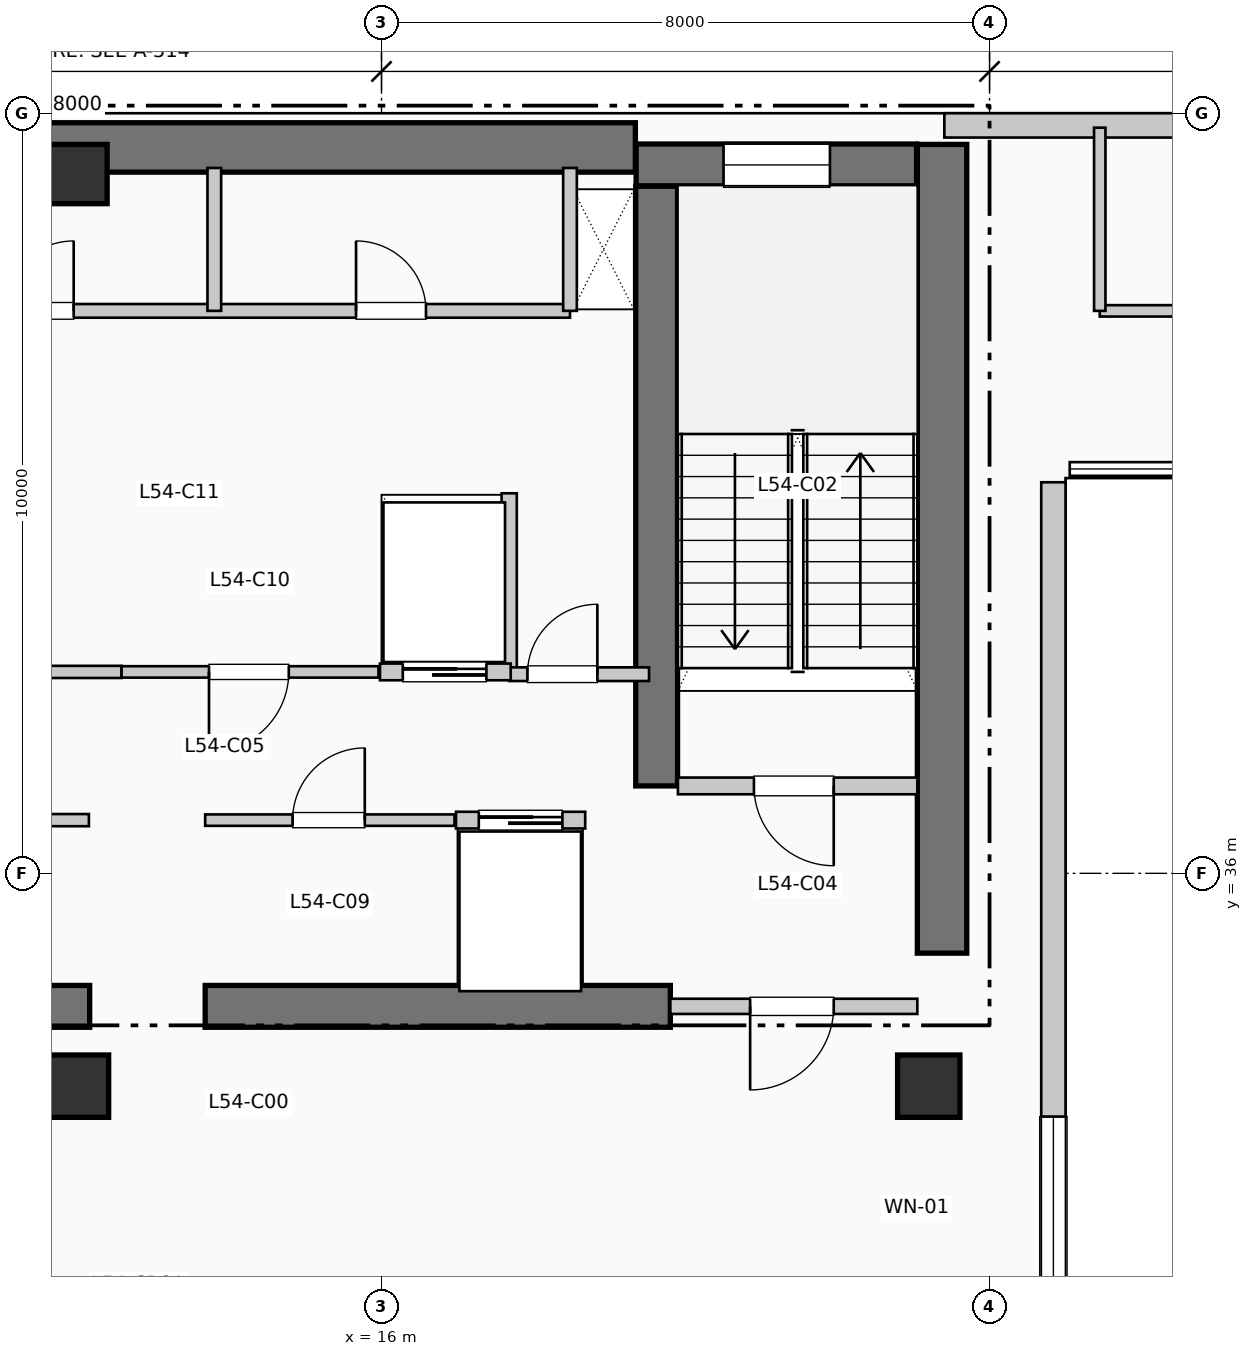
"""IFC4 building model, lengths in metres.
Left out: names, types, materials, properties, quantities, classifications, styles, units other than length and angle.
Written with IfcOpenShell. Run it as: python <this file> out.ifc"""

import sys

from ifc_helpers import new_model, si_unit, direction, frame, frame_2d, origin, origin_2d, place, context, subcontext, project, spatial, rectangle, extrude, element, fill, save


model = new_model("IFC4")
c1 = context("Model", 3, precision=1e-05, world=origin(), true_north=direction((0.0, 1.0)))
c2 = subcontext(c1, "Body", "Model", "MODEL_VIEW")
j1 = project(units=[si_unit("LENGTHUNIT", "METRE"), si_unit("PLANEANGLEUNIT", "RADIAN")], contexts=[c1])
p1 = place(None, origin())
s1 = spatial("IfcSite", under=j1, at=p1, CompositionType="ELEMENT")
p2 = place(p1, origin())
s2 = spatial("IfcBuilding", under=s1, at=p2, CompositionType="ELEMENT")
p3 = place(p2, frame((0.0, 0.0, 223.74)))
s3 = spatial("IfcBuildingStorey", under=s2, at=p3, CompositionType="ELEMENT", Elevation=223.74)
p4 = place(p3, frame((5.36, 45.55, 0.0), z_axis=(0.0, 0.0, 1.0), x_axis=(1.0, 0.0, 0.0)))
e1 = element("IfcWall", 1, at=p4, inside=s3, PredefinedType="SHEAR", context=c2, shape_type="SweptSolid", body=[
    extrude(rectangle(XDim=13.98, YDim=0.65, at=frame_2d((6.99, 0.0))), origin(), (0.0, 0.0, 1.0), 3.96),
])
p5 = place(p3, frame((23.375, 34.95, 0.0), z_axis=(0.0, 0.0, 1.0), x_axis=(0.0, 1.0, 0.0)))
e2 = element("IfcWall", 2, at=p5, inside=s3, PredefinedType="SHEAR", context=c2, shape_type="SweptSolid", body=[
    extrude(rectangle(XDim=10.64, YDim=0.65, at=frame_2d((5.32, 0.0))), origin(), (0.0, 0.0, 1.0), 3.96),
])
p6 = place(p3, frame((1.45, 34.25, 0.0), z_axis=(0.0, 0.0, 1.0), x_axis=(1.0, 0.0, 0.0)))
e3 = element("IfcWall", 3, at=p6, inside=s3, PredefinedType="SHEAR", context=c2, shape_type="SweptSolid", body=[
    extrude(rectangle(XDim=10.71, YDim=0.55, at=frame_2d((5.355, 0.0))), origin(), (0.0, 0.0, 1.0), 3.96),
])
p7 = place(p6, frame((7.25, 0.0, 0.0), z_axis=(0.0, 0.0, 1.0), x_axis=(-1.0, 0.0, 0.0)))
e4 = element("IfcOpeningElement", 4, at=p7, cuts=e3, PredefinedType="OPENING", context=c2, shape_type="SweptSolid", body=[
    extrude(rectangle(XDim=1.1, YDim=2.15, at=frame_2d((0.55, 1.075))), frame((0.0, 0.285, 0.0), z_axis=(0.0, -1.0, 0.0), x_axis=(1.0, 0.0, 0.0)), (0.0, 0.0, 1.0), 0.57),
])
p8 = place(p3, frame((13.68, 34.25, 0.0), z_axis=(0.0, 0.0, 1.0), x_axis=(1.0, 0.0, 0.0)))
e5 = element("IfcWall", 5, at=p8, inside=s3, PredefinedType="SHEAR", context=c2, shape_type="SweptSolid", body=[
    extrude(rectangle(XDim=6.12, YDim=0.55, at=frame_2d((3.06, 0.0))), origin(), (0.0, 0.0, 1.0), 3.96),
])
p9 = place(p3, frame((19.62, 37.15, 0.0), z_axis=(0.0, 0.0, 1.0), x_axis=(0.0, 1.0, 0.0)))
e6 = element("IfcWall", 6, at=p9, inside=s3, PredefinedType="SHEAR", context=c2, shape_type="SweptSolid", body=[
    extrude(rectangle(XDim=7.89, YDim=0.55, at=frame_2d((3.945, 0.0))), origin(), (0.0, 0.0, 1.0), 3.96),
])
p10 = place(p3, frame((19.35, 45.32, 0.0), z_axis=(0.0, 0.0, 1.0), x_axis=(1.0, 0.0, 0.0)))
e7 = element("IfcWall", 7, at=p10, inside=s3, PredefinedType="SHEAR", context=c2, shape_type="SweptSolid", body=[
    extrude(rectangle(XDim=3.69, YDim=0.55, at=frame_2d((1.845, 0.0))), origin(), (0.0, 0.0, 1.0), 3.96),
])
p11 = place(p10, frame((1.15, 0.0, 1.05)))
e8 = element("IfcOpeningElement", 8, at=p11, cuts=e7, PredefinedType="OPENING", context=c2, shape_type="SweptSolid", body=[
    extrude(rectangle(XDim=1.4, YDim=1.8, at=frame_2d((0.7, 0.9))), frame((0.0, 0.285, 0.0), z_axis=(0.0, -1.0, 0.0), x_axis=(1.0, 0.0, 0.0)), (0.0, 0.0, 1.0), 0.57),
])
p12 = place(p3, frame((12.0, 33.2, 0.0), z_axis=(0.0, 0.0, 1.0), x_axis=(1.0, 0.0, 0.0)))
e9 = element("IfcColumn", 9, at=p12, inside=s3, PredefinedType="COLUMN", context=c2, shape_type="SweptSolid", body=[
    extrude(rectangle(XDim=0.82, YDim=0.82, at=origin_2d()), origin(), (0.0, 0.0, 1.0), 3.96),
])
p13 = place(p3, frame((12.0, 45.2, 0.0), z_axis=(0.0, 0.0, 1.0), x_axis=(1.0, 0.0, 0.0)))
e10 = element("IfcColumn", 10, at=p13, inside=s3, PredefinedType="COLUMN", context=c2, shape_type="SweptSolid", body=[
    extrude(rectangle(XDim=0.78, YDim=0.78, at=origin_2d()), origin(), (0.0, 0.0, 1.0), 3.96),
])
p14 = place(p3, frame((23.2, 33.2, 0.0), z_axis=(0.0, 0.0, 1.0), x_axis=(1.0, 0.0, 0.0)))
e11 = element("IfcColumn", 11, at=p14, inside=s3, PredefinedType="COLUMN", context=c2, shape_type="SweptSolid", body=[
    extrude(rectangle(XDim=0.82, YDim=0.82, at=origin_2d()), origin(), (0.0, 0.0, 1.0), 3.96),
])
p15 = place(p3, frame((24.84, 22.055, 0.0), z_axis=(0.0, 0.0, 1.0), x_axis=(0.0, 1.0, 0.0)))
e12 = element("IfcWall", 12, at=p15, inside=s3, PredefinedType="SOLIDWALL", context=c2, shape_type="SweptSolid", body=[
    extrude(rectangle(XDim=19.09, YDim=0.32, at=frame_2d((9.545, 0.0))), origin(), (0.0, 0.0, 1.0), 3.71),
])
p16 = place(p15, frame((8.345, 0.0, 0.85)))
e13 = element("IfcOpeningElement", 13, at=p16, cuts=e12, PredefinedType="OPENING", context=c2, shape_type="SweptSolid", body=[
    extrude(rectangle(XDim=2.4, YDim=2.05, at=frame_2d((1.2, 1.025))), frame((0.0, 0.17, 0.0), z_axis=(0.0, -1.0, 0.0), x_axis=(1.0, 0.0, 0.0)), (0.0, 0.0, 1.0), 0.34),
])
p17 = place(p3, frame((47.145, 45.84, 0.0), z_axis=(0.0, 0.0, 1.0), x_axis=(-1.0, 0.0, 0.0)))
e14 = element("IfcWall", 14, at=p17, inside=s3, PredefinedType="SOLIDWALL", context=c2, shape_type="SweptSolid", body=[
    extrude(rectangle(XDim=23.74, YDim=0.32, at=frame_2d((11.87, 0.0))), origin(), (0.0, 0.0, 1.0), 3.71),
])
p18 = place(p3, frame((19.9, 37.15, 0.0), z_axis=(0.0, 0.0, 1.0), x_axis=(1.0, 0.0, 0.0)))
e15 = element("IfcWall", 15, at=p18, inside=s3, PredefinedType="PARTITIONING", context=c2, shape_type="SweptSolid", body=[
    extrude(rectangle(XDim=3.15, YDim=0.22, at=frame_2d((1.575, 0.0))), origin(), (0.0, 0.0, 1.0), 3.71),
])
p19 = place(p18, frame((2.05, 0.0, 0.0), z_axis=(0.0, 0.0, 1.0), x_axis=(-1.0, 0.0, 0.0)))
e16 = element("IfcOpeningElement", 16, at=p19, cuts=e15, PredefinedType="OPENING", context=c2, shape_type="SweptSolid", body=[
    extrude(rectangle(XDim=1.05, YDim=2.15, at=frame_2d((0.525, 1.075))), frame((0.0, 0.12, 0.0), z_axis=(0.0, -1.0, 0.0), x_axis=(1.0, 0.0, 0.0)), (0.0, 0.0, 1.0), 0.24),
])
p20 = place(p3, frame((19.8, 34.25, 0.0), z_axis=(0.0, 0.0, 1.0), x_axis=(1.0, 0.0, 0.0)))
e17 = element("IfcWall", 17, at=p20, inside=s3, PredefinedType="PARTITIONING", context=c2, shape_type="SweptSolid", body=[
    extrude(rectangle(XDim=3.25, YDim=0.2, at=frame_2d((1.625, 0.0))), origin(), (0.0, 0.0, 1.0), 3.71),
])
p21 = place(p20, frame((2.15, 0.0, 0.0), z_axis=(0.0, 0.0, 1.0), x_axis=(-1.0, 0.0, 0.0)))
e18 = element("IfcOpeningElement", 18, at=p21, cuts=e17, PredefinedType="OPENING", context=c2, shape_type="SweptSolid", body=[
    extrude(rectangle(XDim=1.1, YDim=2.15, at=frame_2d((0.55, 1.075))), frame((0.0, 0.11, 0.0), z_axis=(0.0, -1.0, 0.0), x_axis=(1.0, 0.0, 0.0)), (0.0, 0.0, 1.0), 0.22),
])
p22 = place(p3, frame((17.68, 38.65, 0.0), z_axis=(0.0, 0.0, 1.0), x_axis=(0.0, 1.0, 0.0)))
e19 = element("IfcWall", 19, at=p22, inside=s3, PredefinedType="PARTITIONING", context=c2, shape_type="SweptSolid", body=[
    extrude(rectangle(XDim=2.35, YDim=0.2, at=frame_2d((1.175, 0.0))), origin(), (0.0, 0.0, 1.0), 3.71),
])
p23 = place(p3, frame((17.68, 38.62, 0.0), z_axis=(0.0, 0.0, 1.0), x_axis=(1.0, 0.0, 0.0)))
e20 = element("IfcWall", 20, at=p23, inside=s3, PredefinedType="PARTITIONING", context=c2, shape_type="SweptSolid", body=[
    extrude(rectangle(XDim=1.84, YDim=0.18, at=frame_2d((0.92, 0.0))), origin(), (0.0, 0.0, 1.0), 3.71),
])
p24 = place(p23, frame((0.24, 0.0, 0.0)))
e21 = element("IfcOpeningElement", 21, at=p24, cuts=e20, PredefinedType="OPENING", context=c2, shape_type="SweptSolid", body=[
    extrude(rectangle(XDim=0.92, YDim=2.1, at=frame_2d((0.46, 1.05))), frame((0.0, 0.1, 0.0), z_axis=(0.0, -1.0, 0.0), x_axis=(1.0, 0.0, 0.0)), (0.0, 0.0, 1.0), 0.2),
])
p25 = place(p3, frame((8.9, 36.7, 0.0), z_axis=(0.0, 0.0, 1.0), x_axis=(1.0, 0.0, 0.0)))
e22 = element("IfcWall", 22, at=p25, inside=s3, PredefinedType="PARTITIONING", context=c2, shape_type="SweptSolid", body=[
    extrude(rectangle(XDim=3.25, YDim=0.16, at=frame_2d((1.625, 0.0))), origin(), (0.0, 0.0, 1.0), 3.71),
])
p26 = place(p25, frame((0.26, 0.0, 0.0)))
e23 = element("IfcOpeningElement", 23, at=p26, cuts=e22, PredefinedType="OPENING", context=c2, shape_type="SweptSolid", body=[
    extrude(rectangle(XDim=0.9, YDim=2.15, at=frame_2d((0.45, 1.075))), frame((0.0, 0.09, 0.0), z_axis=(0.0, -1.0, 0.0), x_axis=(1.0, 0.0, 0.0)), (0.0, 0.0, 1.0), 0.18),
])
p27 = place(p25, frame((1.68, 0.0, 0.0)))
e24 = element("IfcOpeningElement", 24, at=p27, cuts=e22, PredefinedType="OPENING", context=c2, shape_type="SweptSolid", body=[
    extrude(rectangle(XDim=0.9, YDim=2.15, at=frame_2d((0.45, 1.075))), frame((0.0, 0.09, 0.0), z_axis=(0.0, -1.0, 0.0), x_axis=(1.0, 0.0, 0.0)), (0.0, 0.0, 1.0), 0.18),
])
p28 = place(p3, frame((9.16, 38.65, 0.0), z_axis=(0.0, 0.0, 1.0), x_axis=(1.0, 0.0, 0.0)))
e25 = element("IfcWall", 25, at=p28, inside=s3, PredefinedType="PARTITIONING", context=c2, shape_type="SweptSolid", body=[
    extrude(rectangle(XDim=3.42, YDim=0.16, at=frame_2d((1.71, 0.0))), origin(), (0.0, 0.0, 1.0), 3.71),
])
p29 = place(p28, frame((2.15, 0.0, 0.0), z_axis=(0.0, 0.0, 1.0), x_axis=(-1.0, 0.0, 0.0)))
e26 = element("IfcOpeningElement", 26, at=p29, cuts=e25, PredefinedType="OPENING", context=c2, shape_type="SweptSolid", body=[
    extrude(rectangle(XDim=0.95, YDim=2.15, at=frame_2d((0.475, 1.075))), frame((0.0, 0.09, 0.0), z_axis=(0.0, -1.0, 0.0), x_axis=(1.0, 0.0, 0.0)), (0.0, 0.0, 1.0), 0.18),
])
p30 = place(p3, frame((13.68, 36.7, 0.0), z_axis=(0.0, 0.0, 1.0), x_axis=(1.0, 0.0, 0.0)))
e27 = element("IfcWall", 27, at=p30, inside=s3, PredefinedType="PARTITIONING", context=c2, shape_type="SweptSolid", body=[
    extrude(rectangle(XDim=3.28, YDim=0.15, at=frame_2d((1.64, 0.0))), origin(), (0.0, 0.0, 1.0), 3.71),
])
p31 = place(p30, frame((1.15, 0.0, 0.0)))
e28 = element("IfcOpeningElement", 28, at=p31, cuts=e27, PredefinedType="OPENING", context=c2, shape_type="SweptSolid", body=[
    extrude(rectangle(XDim=0.95, YDim=2.15, at=frame_2d((0.475, 1.075))), frame((0.0, 0.085, 0.0), z_axis=(0.0, -1.0, 0.0), x_axis=(1.0, 0.0, 0.0)), (0.0, 0.0, 1.0), 0.17),
])
p32 = place(p3, frame((12.58, 38.65, 0.0), z_axis=(0.0, 0.0, 1.0), x_axis=(1.0, 0.0, 0.0)))
e29 = element("IfcWall", 29, at=p32, inside=s3, PredefinedType="PARTITIONING", context=c2, shape_type="SweptSolid", body=[
    extrude(rectangle(XDim=3.38, YDim=0.15, at=frame_2d((1.69, 0.0))), origin(), (0.0, 0.0, 1.0), 3.71),
])
p33 = place(p32, frame((2.2, 0.0, 0.0), z_axis=(0.0, 0.0, 1.0), x_axis=(-1.0, 0.0, 0.0)))
e30 = element("IfcOpeningElement", 30, at=p33, cuts=e29, PredefinedType="OPENING", context=c2, shape_type="SweptSolid", body=[
    extrude(rectangle(XDim=1.05, YDim=2.15, at=frame_2d((0.525, 1.075))), frame((0.0, 0.085, 0.0), z_axis=(0.0, -1.0, 0.0), x_axis=(1.0, 0.0, 0.0)), (0.0, 0.0, 1.0), 0.17),
])
p34 = place(p3, frame((16.98, 36.7, 0.0), z_axis=(0.0, 0.0, 1.0), x_axis=(1.0, 0.0, 0.0)))
e31 = element("IfcWall", 31, at=p34, inside=s3, PredefinedType="PARTITIONING", context=c2, shape_type="SweptSolid", body=[
    extrude(rectangle(XDim=1.7, YDim=0.22, at=frame_2d((0.85, 0.0))), origin(), (0.0, 0.0, 1.0), 3.71),
])
p35 = place(p34, frame((0.3, 0.0, 0.0)))
e32 = element("IfcOpeningElement", 32, at=p35, cuts=e31, PredefinedType="OPENING", context=c2, shape_type="SweptSolid", body=[
    extrude(rectangle(XDim=1.1, YDim=2.2, at=frame_2d((0.55, 1.1))), frame((0.0, 0.12, 0.0), z_axis=(0.0, -1.0, 0.0), x_axis=(1.0, 0.0, 0.0)), (0.0, 0.0, 1.0), 0.24),
])
p36 = place(p3, frame((15.98, 38.65, 0.0), z_axis=(0.0, 0.0, 1.0), x_axis=(1.0, 0.0, 0.0)))
e33 = element("IfcWall", 33, at=p36, inside=s3, PredefinedType="PARTITIONING", context=c2, shape_type="SweptSolid", body=[
    extrude(rectangle(XDim=1.72, YDim=0.22, at=frame_2d((0.86, 0.0))), origin(), (0.0, 0.0, 1.0), 3.71),
])
p37 = place(p36, frame((0.3, 0.0, 0.0)))
e34 = element("IfcOpeningElement", 34, at=p37, cuts=e33, PredefinedType="OPENING", context=c2, shape_type="SweptSolid", body=[
    extrude(rectangle(XDim=1.1, YDim=2.2, at=frame_2d((0.55, 1.1))), frame((0.0, 0.12, 0.0), z_axis=(0.0, -1.0, 0.0), x_axis=(1.0, 0.0, 0.0)), (0.0, 0.0, 1.0), 0.24),
])
p38 = place(p3, frame((9.15, 43.4, 0.0), z_axis=(0.0, 0.0, 1.0), x_axis=(1.0, 0.0, 0.0)))
e35 = element("IfcWall", 35, at=p38, inside=s3, PredefinedType="PLUMBINGWALL", context=c2, shape_type="SweptSolid", body=[
    extrude(rectangle(XDim=9.33, YDim=0.18, at=frame_2d((4.665, 0.0))), origin(), (0.0, 0.0, 1.0), 3.71),
])
p39 = place(p38, frame((1.88, 0.0, 0.0)))
e36 = element("IfcOpeningElement", 36, at=p39, cuts=e35, PredefinedType="OPENING", context=c2, shape_type="SweptSolid", body=[
    extrude(rectangle(XDim=0.92, YDim=2.1, at=frame_2d((0.46, 1.05))), frame((0.0, 0.1, 0.0), z_axis=(0.0, -1.0, 0.0), x_axis=(1.0, 0.0, 0.0)), (0.0, 0.0, 1.0), 0.2),
])
p40 = place(p38, frame((6.515, 0.0, 0.0)))
e37 = element("IfcOpeningElement", 37, at=p40, cuts=e35, PredefinedType="OPENING", context=c2, shape_type="SweptSolid", body=[
    extrude(rectangle(XDim=0.92, YDim=2.1, at=frame_2d((0.46, 1.05))), frame((0.0, 0.1, 0.0), z_axis=(0.0, -1.0, 0.0), x_axis=(1.0, 0.0, 0.0)), (0.0, 0.0, 1.0), 0.2),
])
for number, where, z_axis, x_axis in (
    (38, (18.48, 43.4, 0.0), (0.0, 0.0, 1.0), (0.0, 1.0, 0.0)),
    (39, (13.8, 43.4, 0.0), (0.0, 0.0, 1.0), (0.0, 1.0, 0.0)),
):
    element("IfcWall", number, at=place(p3, frame(where, z_axis=z_axis, x_axis=x_axis)), inside=s3, PredefinedType="PLUMBINGWALL", context=c2, shape_type="SweptSolid", body=[
        extrude(rectangle(XDim=1.88, YDim=0.18, at=frame_2d((0.94, 0.0))), origin(), (0.0, 0.0, 1.0), 3.71),
    ])
p41 = place(p3, frame((25.45, 43.4, 0.0), z_axis=(0.0, 0.0, 1.0), x_axis=(1.0, 0.0, 0.0)))
e40 = element("IfcWall", 40, at=p41, inside=s3, PredefinedType="PARTITIONING", context=c2, shape_type="SweptSolid", body=[
    extrude(rectangle(XDim=15.6, YDim=0.15, at=frame_2d((7.8, 0.0))), origin(), (0.0, 0.0, 1.0), 3.71),
])
p42 = place(p41, frame((3.581, 0.0, 0.0)))
e41 = element("IfcOpeningElement", 41, at=p42, cuts=e40, PredefinedType="OPENING", context=c2, shape_type="SweptSolid", body=[
    extrude(rectangle(XDim=0.95, YDim=2.15, at=frame_2d((0.475, 1.075))), frame((0.0, 0.085, 0.0), z_axis=(0.0, -1.0, 0.0), x_axis=(1.0, 0.0, 0.0)), (0.0, 0.0, 1.0), 0.17),
])
p43 = place(p41, frame((11.381, 0.0, 0.0)))
e42 = element("IfcOpeningElement", 42, at=p43, cuts=e40, PredefinedType="OPENING", context=c2, shape_type="SweptSolid", body=[
    extrude(rectangle(XDim=0.95, YDim=2.15, at=frame_2d((0.475, 1.075))), frame((0.0, 0.085, 0.0), z_axis=(0.0, -1.0, 0.0), x_axis=(1.0, 0.0, 0.0)), (0.0, 0.0, 1.0), 0.17),
])
p44 = place(p3, frame((25.45, 43.4, 0.0), z_axis=(0.0, 0.0, 1.0), x_axis=(0.0, 1.0, 0.0)))
e43 = element("IfcWall", 43, at=p44, inside=s3, PredefinedType="PARTITIONING", context=c2, shape_type="SweptSolid", body=[
    extrude(rectangle(XDim=2.41, YDim=0.15, at=frame_2d((1.205, 0.0))), origin(), (0.0, 0.0, 1.0), 3.71),
])
p45 = place(p11, origin())
e44 = element("IfcWindow", 44, at=p45, inside=s3, PartitioningType="SINGLE_PANEL", PredefinedType="WINDOW", context=c2, shape_type="SweptSolid", body=[
    extrude(rectangle(XDim=1.4, YDim=1.8, at=frame_2d((0.7, 0.9))), frame((0.0, 0.03, 0.0), z_axis=(0.0, -1.0, 0.0), x_axis=(1.0, 0.0, 0.0)), (0.0, 0.0, 1.0), 0.06),
])
fill(e8, e44)
p46 = place(p16, origin())
e45 = element("IfcWindow", 45, at=p46, inside=s3, PartitioningType="SINGLE_PANEL", PredefinedType="WINDOW", context=c2, shape_type="SweptSolid", body=[
    extrude(rectangle(XDim=2.4, YDim=2.05, at=frame_2d((1.2, 1.025))), frame((0.0, 0.03, 0.0), z_axis=(0.0, -1.0, 0.0), x_axis=(1.0, 0.0, 0.0)), (0.0, 0.0, 1.0), 0.06),
])
fill(e13, e45)
p47 = place(p19, origin())
e46 = element("IfcDoor", 46, at=p47, inside=s3, OperationType="SINGLE_SWING_RIGHT", PredefinedType="DOOR", context=c2, shape_type="SweptSolid", body=[
    extrude(rectangle(XDim=1.05, YDim=2.15, at=frame_2d((0.525, 1.075))), frame((0.0, 0.025, 0.0), z_axis=(0.0, -1.0, 0.0), x_axis=(1.0, 0.0, 0.0)), (0.0, 0.0, 1.0), 0.05),
])
fill(e16, e46)
p48 = place(p21, origin())
e47 = element("IfcDoor", 47, at=p48, inside=s3, OperationType="SINGLE_SWING_LEFT", PredefinedType="DOOR", context=c2, shape_type="SweptSolid", body=[
    extrude(rectangle(XDim=1.1, YDim=2.15, at=frame_2d((0.55, 1.075))), frame((0.0, 0.025, 0.0), z_axis=(0.0, -1.0, 0.0), x_axis=(1.0, 0.0, 0.0)), (0.0, 0.0, 1.0), 0.05),
])
fill(e18, e47)
p49 = place(p24, origin())
e48 = element("IfcDoor", 48, at=p49, inside=s3, OperationType="SINGLE_SWING_RIGHT", PredefinedType="DOOR", context=c2, shape_type="SweptSolid", body=[
    extrude(rectangle(XDim=0.92, YDim=2.1, at=frame_2d((0.46, 1.05))), frame((0.0, 0.025, 0.0), z_axis=(0.0, -1.0, 0.0), x_axis=(1.0, 0.0, 0.0)), (0.0, 0.0, 1.0), 0.05),
])
fill(e21, e48)
p50 = place(p31, origin())
e49 = element("IfcDoor", 49, at=p50, inside=s3, OperationType="SINGLE_SWING_RIGHT", PredefinedType="DOOR", context=c2, shape_type="SweptSolid", body=[
    extrude(rectangle(XDim=0.95, YDim=2.15, at=frame_2d((0.475, 1.075))), frame((0.0, 0.025, 0.0), z_axis=(0.0, -1.0, 0.0), x_axis=(1.0, 0.0, 0.0)), (0.0, 0.0, 1.0), 0.05),
])
fill(e28, e49)
p51 = place(p33, origin())
e50 = element("IfcDoor", 50, at=p51, inside=s3, OperationType="SINGLE_SWING_LEFT", PredefinedType="DOOR", context=c2, shape_type="SweptSolid", body=[
    extrude(rectangle(XDim=1.05, YDim=2.15, at=frame_2d((0.525, 1.075))), frame((0.0, 0.025, 0.0), z_axis=(0.0, -1.0, 0.0), x_axis=(1.0, 0.0, 0.0)), (0.0, 0.0, 1.0), 0.05),
])
fill(e30, e50)
p52 = place(p35, origin())
e51 = element("IfcDoor", 51, at=p52, inside=s3, OperationType="SLIDING_TO_LEFT", PredefinedType="DOOR", context=c2, shape_type="SweptSolid", body=[
    extrude(rectangle(XDim=1.1, YDim=2.2, at=frame_2d((0.55, 1.1))), frame((0.0, 0.025, 0.0), z_axis=(0.0, -1.0, 0.0), x_axis=(1.0, 0.0, 0.0)), (0.0, 0.0, 1.0), 0.05),
])
fill(e32, e51)
p53 = place(p37, origin())
e52 = element("IfcDoor", 52, at=p53, inside=s3, OperationType="SLIDING_TO_LEFT", PredefinedType="DOOR", context=c2, shape_type="SweptSolid", body=[
    extrude(rectangle(XDim=1.1, YDim=2.2, at=frame_2d((0.55, 1.1))), frame((0.0, 0.025, 0.0), z_axis=(0.0, -1.0, 0.0), x_axis=(1.0, 0.0, 0.0)), (0.0, 0.0, 1.0), 0.05),
])
fill(e34, e52)
p54 = place(p39, origin())
e53 = element("IfcDoor", 53, at=p54, inside=s3, OperationType="SINGLE_SWING_RIGHT", PredefinedType="DOOR", context=c2, shape_type="SweptSolid", body=[
    extrude(rectangle(XDim=0.92, YDim=2.1, at=frame_2d((0.46, 1.05))), frame((0.0, 0.025, 0.0), z_axis=(0.0, -1.0, 0.0), x_axis=(1.0, 0.0, 0.0)), (0.0, 0.0, 1.0), 0.05),
])
fill(e36, e53)
p55 = place(p40, origin())
e54 = element("IfcDoor", 54, at=p55, inside=s3, OperationType="SINGLE_SWING_LEFT", PredefinedType="DOOR", context=c2, shape_type="SweptSolid", body=[
    extrude(rectangle(XDim=0.92, YDim=2.1, at=frame_2d((0.46, 1.05))), frame((0.0, 0.025, 0.0), z_axis=(0.0, -1.0, 0.0), x_axis=(1.0, 0.0, 0.0)), (0.0, 0.0, 1.0), 0.05),
])
fill(e37, e54)
save(model, sys.argv[1])
